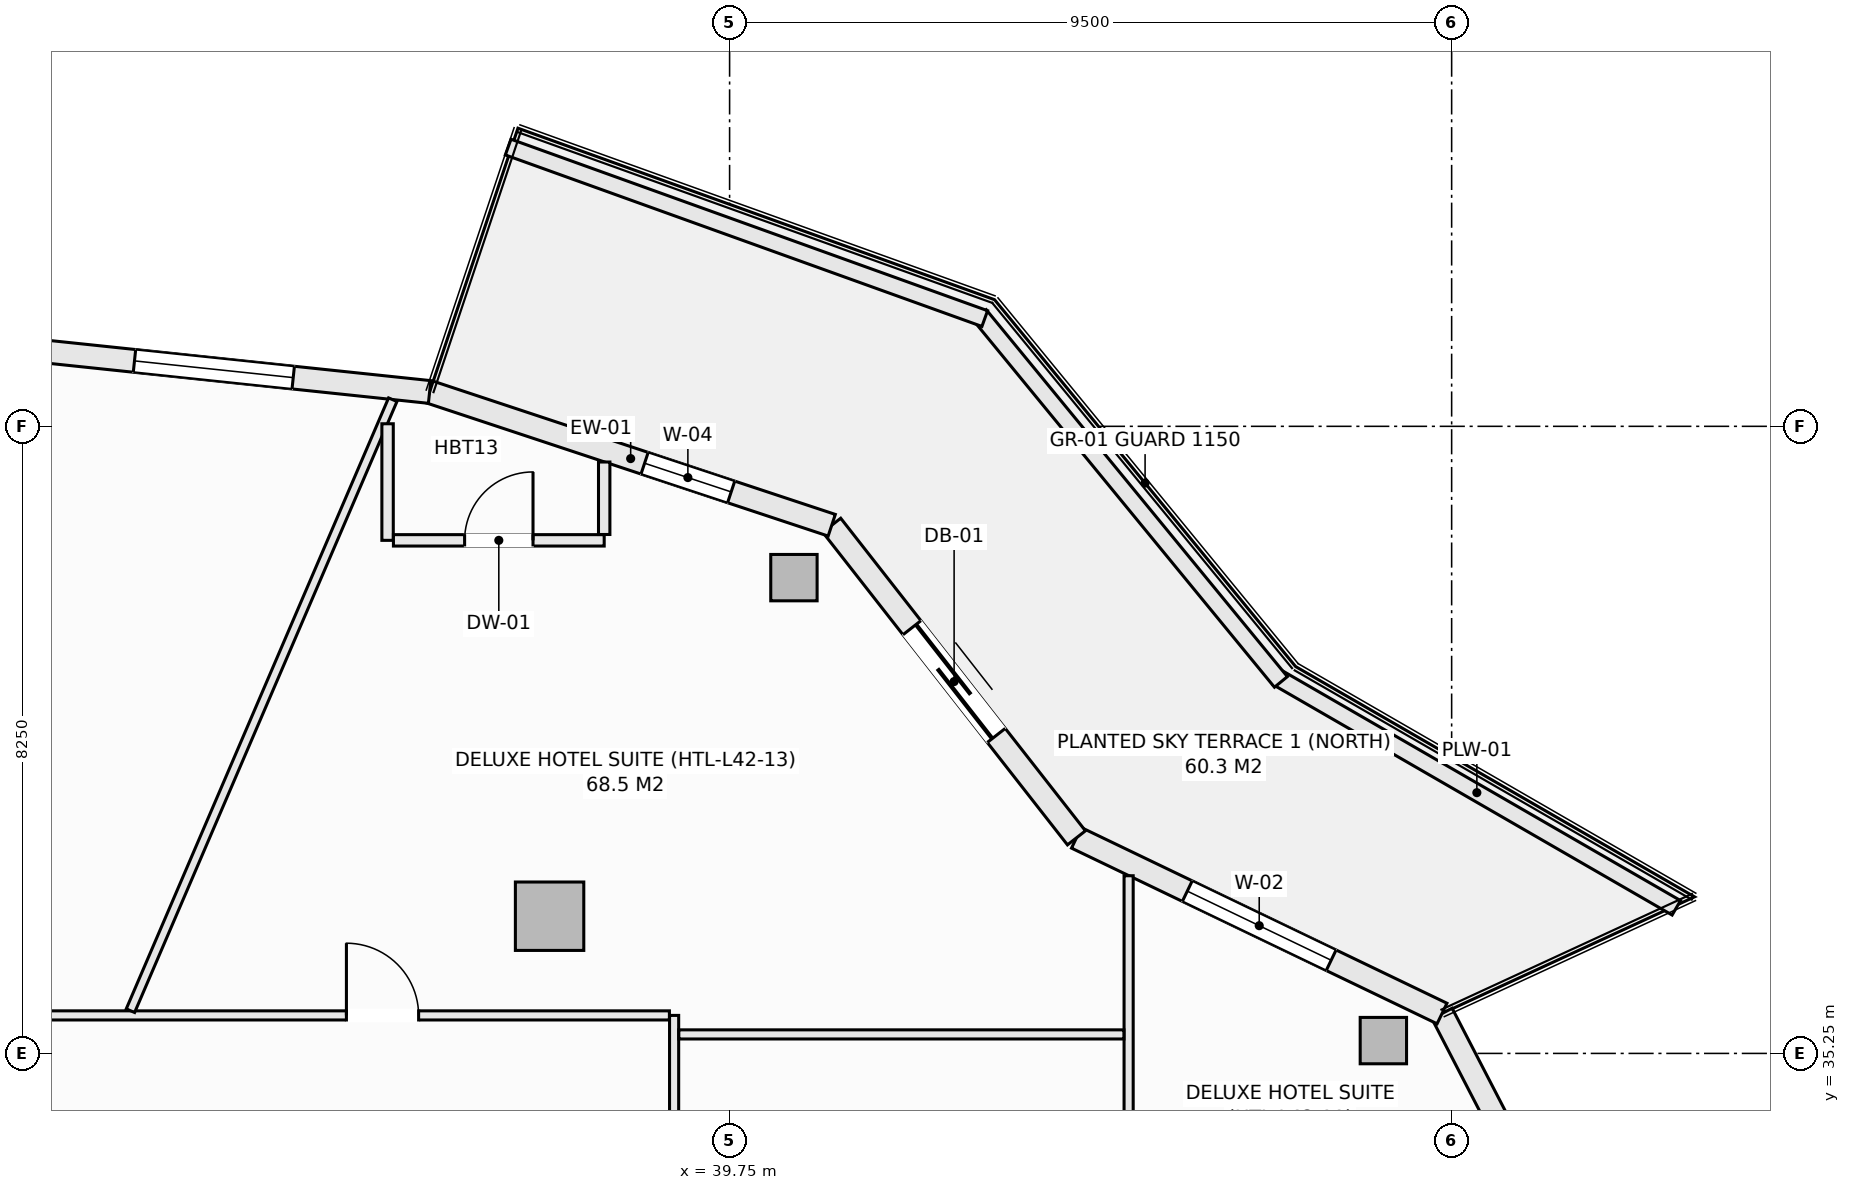
"""IFC4 building model, lengths in metres.
Left out: names, types, materials, properties, quantities, classifications, styles, units other than length and angle.
Written with IfcOpenShell. Run it as: python <this file> out.ifc"""

import sys

from ifc_helpers import new_model, si_unit, direction, frame, frame_2d, origin, origin_2d, place, context, subcontext, project, spatial, rectangle, hollow_rectangle, extrude, element, fill, save


model = new_model("IFC4")
c1 = context("Model", 3, precision=1e-05, world=origin(), true_north=direction((0.0, 1.0)))
c2 = subcontext(c1, "Body", "Model", "MODEL_VIEW")
j1 = project(units=[si_unit("LENGTHUNIT", "METRE"), si_unit("PLANEANGLEUNIT", "RADIAN")], contexts=[c1])
p1 = place(None, origin())
s1 = spatial("IfcSite", under=j1, at=p1, CompositionType="ELEMENT")
p2 = place(p1, origin())
s2 = spatial("IfcBuilding", under=s1, at=p2, CompositionType="ELEMENT")
p3 = place(p2, frame((0.0, 0.0, 163.1)))
s3 = spatial("IfcBuildingStorey", under=s2, at=p3, CompositionType="ELEMENT", Elevation=163.1)
for number, where, z_axis, x_axis in (
    (1, (48.352, 35.419, -0.27), (0.0, 0.0, 1.0), (1.0, 0.0, 0.0)),
    (2, (40.596, 41.51, -0.27), (0.0, 0.0, 1.0), (1.0, 0.0, 0.0)),
):
    element("IfcColumn", number, at=place(p3, frame(where, z_axis=z_axis, x_axis=x_axis)), inside=s3, PredefinedType="COLUMN", context=c2, shape_type="SweptSolid", body=[
        extrude(hollow_rectangle(XDim=0.61, YDim=0.61, WallThickness=0.025, at=origin_2d()), origin(), (0.0, 0.0, 1.0), 3.4),
    ])
p4 = place(p3, frame((37.382, 37.055, -0.27), z_axis=(0.0, 0.0, 1.0), x_axis=(1.0, 0.0, 0.0)))
e3 = element("IfcColumn", 3, at=p4, inside=s3, PredefinedType="COLUMN", context=c2, shape_type="SweptSolid", body=[
    extrude(rectangle(XDim=0.9, YDim=0.9, at=origin_2d()), origin(), (0.0, 0.0, 1.0), 3.4),
])
p5 = place(p3, frame((49.123, 35.775, 0.0), z_axis=(0.0, 0.0, 1.0), x_axis=(0.459810251451, -0.888017191647, 0.0)))
e4 = element("IfcWall", 4, at=p5, inside=s3, PredefinedType="SOLIDWALL", context=c2, shape_type="SweptSolid", body=[
    extrude(rectangle(XDim=4.766, YDim=0.3, at=frame_2d((2.383, 0.0))), origin(), (0.0, 0.0, 1.0), 2.653),
])
p6 = place(p5, frame((2.18, 0.0, 0.72)))
e5 = element("IfcOpeningElement", 5, at=p6, cuts=e4, PredefinedType="OPENING", context=c2, shape_type="SweptSolid", body=[
    extrude(rectangle(XDim=1.2, YDim=1.65, at=frame_2d((0.6, 0.825))), frame((0.0, 0.16, 0.0), z_axis=(0.0, -1.0, 0.0), x_axis=(1.0, 0.0, 0.0)), (0.0, 0.0, 1.0), 0.32),
])
p7 = place(p3, frame((44.313, 38.086, 0.0), z_axis=(0.0, 0.0, 1.0), x_axis=(0.901353070301, -0.433085029363, 0.0)))
e6 = element("IfcWall", 6, at=p7, inside=s3, PredefinedType="SOLIDWALL", context=c2, shape_type="SweptSolid", body=[
    extrude(rectangle(XDim=5.336, YDim=0.3, at=frame_2d((2.668, 0.0))), origin(), (0.0, 0.0, 1.0), 2.653),
])
p8 = place(p7, frame((1.618, 0.0, 0.74)))
e7 = element("IfcOpeningElement", 7, at=p8, cuts=e6, PredefinedType="OPENING", context=c2, shape_type="SweptSolid", body=[
    extrude(rectangle(XDim=2.1, YDim=1.7, at=frame_2d((1.05, 0.85))), frame((0.0, 0.16, 0.0), z_axis=(0.0, -1.0, 0.0), x_axis=(1.0, 0.0, 0.0)), (0.0, 0.0, 1.0), 0.32),
])
p9 = place(p3, frame((41.094, 42.199, 0.0), z_axis=(0.0, 0.0, 1.0), x_axis=(0.616429245738, -0.787410302828, 0.0)))
e8 = element("IfcWall", 8, at=p9, inside=s3, PredefinedType="SOLIDWALL", context=c2, shape_type="SweptSolid", body=[
    extrude(rectangle(XDim=5.223, YDim=0.3, at=frame_2d((2.612, 0.0))), origin(), (0.0, 0.0, 1.0), 2.653),
])
p10 = place(p9, frame((1.712, 0.0, 0.0)))
e9 = element("IfcOpeningElement", 9, at=p10, cuts=e8, PredefinedType="OPENING", context=c2, shape_type="SweptSolid", body=[
    extrude(rectangle(XDim=1.8, YDim=2.25, at=frame_2d((0.9, 1.125))), frame((0.0, 0.16, 0.0), z_axis=(0.0, -1.0, 0.0), x_axis=(1.0, 0.0, 0.0)), (0.0, 0.0, 1.0), 0.32),
])
p11 = place(p3, frame((35.803, 43.952, 0.0), z_axis=(0.0, 0.0, 1.0), x_axis=(0.949246811547, -0.314532177636, 0.0)))
e10 = element("IfcWall", 10, at=p11, inside=s3, PredefinedType="SOLIDWALL", context=c2, shape_type="SweptSolid", body=[
    extrude(rectangle(XDim=5.574, YDim=0.3, at=frame_2d((2.787, 0.0))), origin(), (0.0, 0.0, 1.0), 2.653),
])
p12 = place(p11, frame((2.98, 0.0, 0.72)))
e11 = element("IfcOpeningElement", 11, at=p12, cuts=e10, PredefinedType="OPENING", context=c2, shape_type="SweptSolid", body=[
    extrude(rectangle(XDim=1.2, YDim=1.65, at=frame_2d((0.6, 0.825))), frame((0.0, 0.16, 0.0), z_axis=(0.0, -1.0, 0.0), x_axis=(1.0, 0.0, 0.0)), (0.0, 0.0, 1.0), 0.32),
])
p13 = place(p3, frame((30.125, 44.55, 0.0), z_axis=(0.0, 0.0, 1.0), x_axis=(0.994496545245, -0.104769372887, 0.0)))
e12 = element("IfcWall", 12, at=p13, inside=s3, PredefinedType="SOLIDWALL", context=c2, shape_type="SweptSolid", body=[
    extrude(rectangle(XDim=5.709, YDim=0.3, at=frame_2d((2.854, 0.0))), origin(), (0.0, 0.0, 1.0), 2.653),
])
p14 = place(p13, frame((1.805, 0.0, 0.74)))
e13 = element("IfcOpeningElement", 13, at=p14, cuts=e12, PredefinedType="OPENING", context=c2, shape_type="SweptSolid", body=[
    extrude(rectangle(XDim=2.1, YDim=1.7, at=frame_2d((1.05, 0.85))), frame((0.0, 0.16, 0.0), z_axis=(0.0, -1.0, 0.0), x_axis=(1.0, 0.0, 0.0)), (0.0, 0.0, 1.0), 0.32),
])
p15 = place(p3, frame((46.958, 40.195, 0.0), z_axis=(0.0, 0.0, 1.0), x_axis=(0.866058128659, -0.499943314571, 0.0)))
e14 = element("IfcWall", 14, at=p15, inside=s3, PredefinedType="PARAPET", context=c2, shape_type="SweptSolid", body=[
    extrude(rectangle(XDim=6.06, YDim=0.22, at=frame_2d((3.03, 0.0))), origin(), (0.0, 0.0, 1.0), 0.52),
])
p16 = place(p3, frame((43.042, 44.964, 0.0), z_axis=(0.0, 0.0, 1.0), x_axis=(0.634429234628, -0.77298094818, 0.0)))
e15 = element("IfcWall", 15, at=p16, inside=s3, PredefinedType="PARAPET", context=c2, shape_type="SweptSolid", body=[
    extrude(rectangle(XDim=6.245, YDim=0.22, at=frame_2d((3.123, 0.0))), origin(), (0.0, 0.0, 1.0), 0.52),
])
p17 = place(p3, frame((36.837, 47.174, 0.0), z_axis=(0.0, 0.0, 1.0), x_axis=(0.940948576924, -0.338549517184, 0.0)))
e16 = element("IfcWall", 16, at=p17, inside=s3, PredefinedType="PARAPET", context=c2, shape_type="SweptSolid", body=[
    extrude(rectangle(XDim=6.664, YDim=0.22, at=frame_2d((3.332, 0.0))), origin(), (0.0, 0.0, 1.0), 0.52),
])
p18 = place(p3, frame((39.02, 33.75, 0.0), z_axis=(0.0, 0.0, 1.0), x_axis=(0.0, 1.0, 0.0)))
e17 = element("IfcWall", 17, at=p18, inside=s3, PredefinedType="PARTITIONING", context=c2, shape_type="SweptSolid", body=[
    extrude(rectangle(XDim=2.0, YDim=0.12, at=frame_2d((1.0, 0.0))), origin(), (0.0, 0.0, 1.0), 3.13),
])
p19 = place(p3, frame((29.842, 35.75, 0.0), z_axis=(0.0, 0.0, 1.0), x_axis=(1.0, 0.0, 0.0)))
e18 = element("IfcWall", 18, at=p19, inside=s3, PredefinedType="PARTITIONING", context=c2, shape_type="SweptSolid", body=[
    extrude(rectangle(XDim=9.116, YDim=0.12, at=frame_2d((4.558, 0.0))), origin(), (0.0, 0.0, 1.0), 2.505),
])
p20 = place(p19, frame((4.866, 0.0, 0.0)))
e19 = element("IfcOpeningElement", 19, at=p20, cuts=e18, PredefinedType="OPENING", context=c2, shape_type="SweptSolid", body=[
    extrude(rectangle(XDim=0.95, YDim=2.1, at=frame_2d((0.475, 1.05))), frame((0.0, 0.07, 0.0), z_axis=(0.0, -1.0, 0.0), x_axis=(1.0, 0.0, 0.0)), (0.0, 0.0, 1.0), 0.14),
])
p21 = place(p3, frame((45.0, 33.853, 0.0), z_axis=(0.0, 0.0, 1.0), x_axis=(0.0, 1.0, 0.0)))
e20 = element("IfcWall", 20, at=p21, inside=s3, PredefinedType="PARTITIONING", context=c2, shape_type="SweptSolid", body=[
    extrude(rectangle(XDim=3.735, YDim=0.12, at=frame_2d((1.867, 0.0))), origin(), (0.0, 0.0, 1.0), 3.13),
])
p22 = place(p3, frame((39.082, 35.5, 0.0), z_axis=(0.0, 0.0, 1.0), x_axis=(1.0, 0.0, 0.0)))
e21 = element("IfcWall", 21, at=p22, inside=s3, PredefinedType="PARTITIONING", context=c2, shape_type="SweptSolid", body=[
    extrude(rectangle(XDim=5.856, YDim=0.12, at=frame_2d((2.928, 0.0))), origin(), (0.0, 0.0, 1.0), 2.812),
])
p23 = place(p3, frame((31.867, 35.812, 0.0), z_axis=(0.0, 0.0, 1.0), x_axis=(0.394572646642, 0.918864748765, 0.0)))
e22 = element("IfcWall", 22, at=p23, inside=s3, PredefinedType="PARTITIONING", context=c2, shape_type="SweptSolid", body=[
    extrude(rectangle(XDim=8.748, YDim=0.12, at=frame_2d((4.374, 0.0))), origin(), (0.0, 0.0, 1.0), 3.13),
])
p24 = place(p3, frame((35.25, 42.0, 0.0), z_axis=(0.0, 0.0, 1.0), x_axis=(0.0, 1.0, 0.0)))
e23 = element("IfcWall", 23, at=p24, inside=s3, PredefinedType="PARTITIONING", context=c2, shape_type="SweptSolid", body=[
    extrude(rectangle(XDim=1.534, YDim=0.15, at=frame_2d((0.767, 0.0))), origin(), (0.0, 0.0, 1.0), 2.812),
])
p25 = place(p3, frame((35.327, 42.0, 0.0), z_axis=(0.0, 0.0, 1.0), x_axis=(1.0, 0.0, 0.0)))
e24 = element("IfcWall", 24, at=p25, inside=s3, PredefinedType="PARTITIONING", context=c2, shape_type="SweptSolid", body=[
    extrude(rectangle(XDim=2.773, YDim=0.15, at=frame_2d((1.387, 0.0))), origin(), (0.0, 0.0, 1.0), 2.653),
])
p26 = place(p25, frame((0.937, 0.0, 0.0)))
e25 = element("IfcOpeningElement", 25, at=p26, cuts=e24, PredefinedType="OPENING", context=c2, shape_type="SweptSolid", body=[
    extrude(rectangle(XDim=0.9, YDim=2.1, at=frame_2d((0.45, 1.05))), frame((0.0, 0.085, 0.0), z_axis=(0.0, -1.0, 0.0), x_axis=(1.0, 0.0, 0.0)), (0.0, 0.0, 1.0), 0.17),
])
p27 = place(p3, frame((38.1, 42.077, 0.0), z_axis=(0.0, 0.0, 1.0), x_axis=(0.0, 1.0, 0.0)))
e26 = element("IfcWall", 26, at=p27, inside=s3, PredefinedType="PARTITIONING", context=c2, shape_type="SweptSolid", body=[
    extrude(rectangle(XDim=0.954, YDim=0.15, at=frame_2d((0.477, 0.0))), origin(), (0.0, 0.0, 1.0), 3.13),
])
p28 = place(p8, origin())
e27 = element("IfcWindow", 27, at=p28, inside=s3, PartitioningType="SINGLE_PANEL", PredefinedType="WINDOW", context=c2, shape_type="SweptSolid", body=[
    extrude(rectangle(XDim=2.1, YDim=1.7, at=frame_2d((1.05, 0.85))), frame((0.0, 0.03, 0.0), z_axis=(0.0, -1.0, 0.0), x_axis=(1.0, 0.0, 0.0)), (0.0, 0.0, 1.0), 0.06),
])
fill(e7, e27)
p29 = place(p10, origin())
e28 = element("IfcDoor", 28, at=p29, inside=s3, OperationType="SLIDING_TO_LEFT", PredefinedType="DOOR", context=c2, shape_type="SweptSolid", body=[
    extrude(rectangle(XDim=1.8, YDim=2.25, at=frame_2d((0.9, 1.125))), frame((0.0, 0.025, 0.0), z_axis=(0.0, -1.0, 0.0), x_axis=(1.0, 0.0, 0.0)), (0.0, 0.0, 1.0), 0.05),
])
fill(e9, e28)
p30 = place(p12, origin())
e29 = element("IfcWindow", 29, at=p30, inside=s3, PartitioningType="SINGLE_PANEL", PredefinedType="WINDOW", context=c2, shape_type="SweptSolid", body=[
    extrude(rectangle(XDim=1.2, YDim=1.65, at=frame_2d((0.6, 0.825))), frame((0.0, 0.03, 0.0), z_axis=(0.0, -1.0, 0.0), x_axis=(1.0, 0.0, 0.0)), (0.0, 0.0, 1.0), 0.06),
])
fill(e11, e29)
p31 = place(p14, origin())
e30 = element("IfcWindow", 30, at=p31, inside=s3, PartitioningType="SINGLE_PANEL", PredefinedType="WINDOW", context=c2, shape_type="SweptSolid", body=[
    extrude(rectangle(XDim=2.1, YDim=1.7, at=frame_2d((1.05, 0.85))), frame((0.0, 0.03, 0.0), z_axis=(0.0, -1.0, 0.0), x_axis=(1.0, 0.0, 0.0)), (0.0, 0.0, 1.0), 0.06),
])
fill(e13, e30)
p32 = place(p20, origin())
e31 = element("IfcDoor", 31, at=p32, inside=s3, OperationType="SINGLE_SWING_LEFT", PredefinedType="DOOR", context=c2, shape_type="SweptSolid", body=[
    extrude(rectangle(XDim=0.95, YDim=2.1, at=frame_2d((0.475, 1.05))), frame((0.0, 0.025, 0.0), z_axis=(0.0, -1.0, 0.0), x_axis=(1.0, 0.0, 0.0)), (0.0, 0.0, 1.0), 0.05),
])
fill(e19, e31)
p33 = place(p26, origin())
e32 = element("IfcDoor", 32, at=p33, inside=s3, OperationType="SINGLE_SWING_RIGHT", PredefinedType="DOOR", context=c2, shape_type="SweptSolid", body=[
    extrude(rectangle(XDim=0.9, YDim=2.1, at=frame_2d((0.45, 1.05))), frame((0.0, 0.025, 0.0), z_axis=(0.0, -1.0, 0.0), x_axis=(1.0, 0.0, 0.0)), (0.0, 0.0, 1.0), 0.05),
])
fill(e25, e32)
save(model, sys.argv[1])
